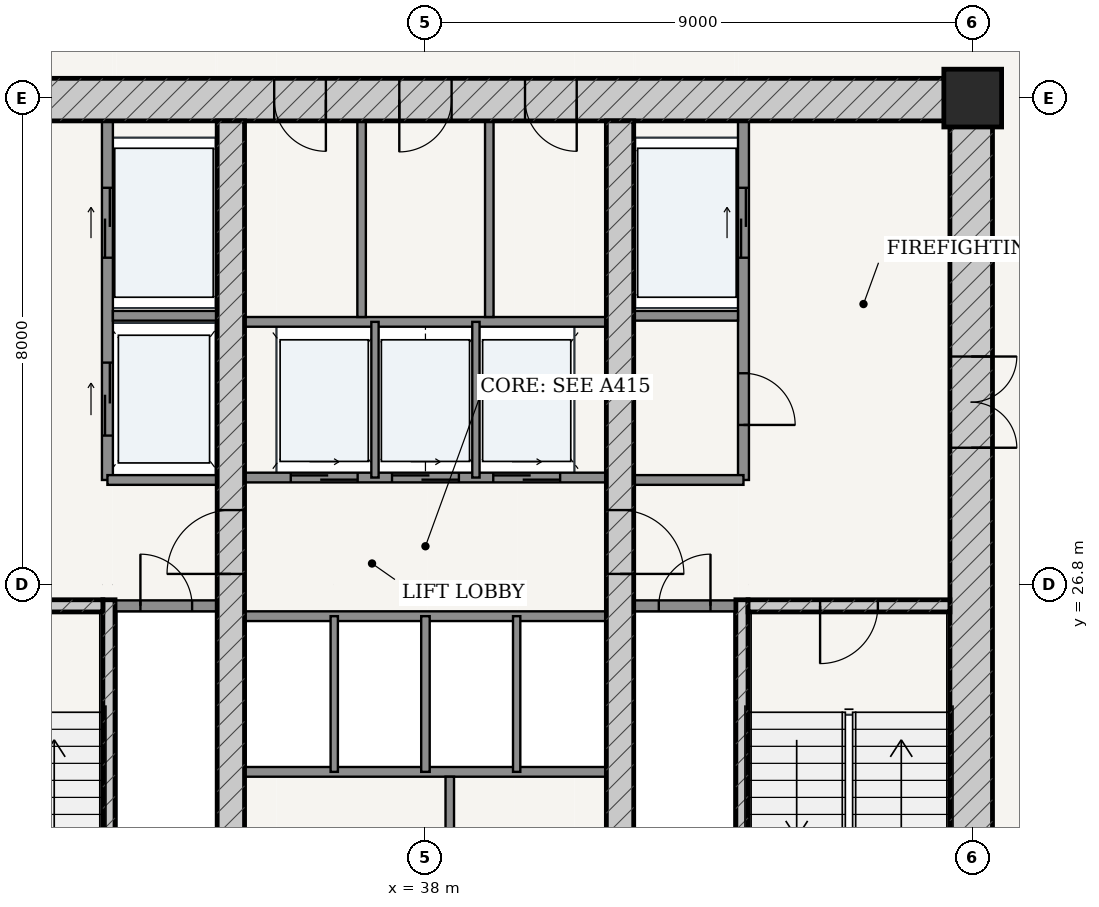
"""IFC4 building model, lengths in metres.
Left out: names, types, materials, properties, quantities, classifications, styles, units other than length and angle.
Written with IfcOpenShell. Run it as: python <this file> out.ifc"""

import sys

from ifc_helpers import new_model, si_unit, direction, frame, frame_2d, origin, origin_2d, place, context, subcontext, project, spatial, rectangle, extrude, source, transform, mapped, element, fill, save


model = new_model("IFC4")
c1 = context("Model", 3, precision=1e-05, world=origin(), true_north=direction((-0.2419218956, 0.970295726276)))
c2 = subcontext(c1, "Body", "Model", "MODEL_VIEW")
j1 = project(units=[si_unit("LENGTHUNIT", "METRE"), si_unit("PLANEANGLEUNIT", "RADIAN")], contexts=[c1])
p1 = place(None, origin())
s1 = spatial("IfcSite", under=j1, at=p1, CompositionType="ELEMENT")
p2 = place(p1, origin())
s2 = spatial("IfcBuilding", under=s1, at=p2, CompositionType="ELEMENT")
p3 = place(p2, frame((0.0, 0.0, 83.4)))
s3 = spatial("IfcBuildingStorey", under=s2, at=p3, CompositionType="ELEMENT", Elevation=83.4)
p4 = place(p3, frame((47.0, 34.8, 0.0), z_axis=(0.0, 0.0, 1.0), x_axis=(1.0, 0.0, 0.0)))
e1 = element("IfcColumn", 1, at=p4, inside=s3, PredefinedType="COLUMN", context=c2, shape_type="SweptSolid", body=[
    extrude(rectangle(XDim=0.95, YDim=0.95, at=origin_2d()), origin(), (0.0, 0.0, 1.0), 3.6),
])
p5 = place(p3, frame((28.675, 34.775, 0.0), z_axis=(0.0, 0.0, 1.0), x_axis=(1.0, 0.0, 0.0)))
e2 = element("IfcWall", 2, at=p5, inside=s3, PredefinedType="SHEAR", context=c2, shape_type="SweptSolid", body=[
    extrude(rectangle(XDim=18.65, YDim=0.7, at=frame_2d((9.325, 0.0))), origin(), (0.0, 0.0, 1.0), 3.325),
])
p6 = place(p5, frame((6.837, 0.0, 0.0)))
e3 = element("IfcOpeningElement", 3, at=p6, cuts=e2, PredefinedType="OPENING", context=c2, shape_type="SweptSolid", body=[
    extrude(rectangle(XDim=0.85, YDim=2.1, at=frame_2d((0.425, 1.05))), frame((0.0, 0.36, 0.0), z_axis=(0.0, -1.0, 0.0), x_axis=(1.0, 0.0, 0.0)), (0.0, 0.0, 1.0), 0.72),
])
p7 = place(p5, frame((8.895, 0.0, 0.0)))
e4 = element("IfcOpeningElement", 4, at=p7, cuts=e2, PredefinedType="OPENING", context=c2, shape_type="SweptSolid", body=[
    extrude(rectangle(XDim=0.86, YDim=2.1, at=frame_2d((0.43, 1.05))), frame((0.0, 0.36, 0.0), z_axis=(0.0, -1.0, 0.0), x_axis=(1.0, 0.0, 0.0)), (0.0, 0.0, 1.0), 0.72),
])
p8 = place(p5, frame((10.962, 0.0, 0.0)))
e5 = element("IfcOpeningElement", 5, at=p8, cuts=e2, PredefinedType="OPENING", context=c2, shape_type="SweptSolid", body=[
    extrude(rectangle(XDim=0.85, YDim=2.1, at=frame_2d((0.425, 1.05))), frame((0.0, 0.36, 0.0), z_axis=(0.0, -1.0, 0.0), x_axis=(1.0, 0.0, 0.0)), (0.0, 0.0, 1.0), 0.72),
])
p9 = place(p3, frame((46.975, 19.175, 0.0), z_axis=(0.0, 0.0, 1.0), x_axis=(0.0, 1.0, 0.0)))
e6 = element("IfcWall", 6, at=p9, inside=s3, PredefinedType="SHEAR", context=c2, shape_type="SweptSolid", body=[
    extrude(rectangle(XDim=15.25, YDim=0.7, at=frame_2d((7.625, 0.0))), origin(), (0.0, 0.0, 1.0), 3.325),
])
p10 = place(p9, frame((9.875, 0.0, 0.0)))
e7 = element("IfcOpeningElement", 7, at=p10, cuts=e6, PredefinedType="OPENING", context=c2, shape_type="SweptSolid", body=[
    extrude(rectangle(XDim=1.5, YDim=2.2, at=frame_2d((0.75, 1.1))), frame((0.0, 0.36, 0.0), z_axis=(0.0, -1.0, 0.0), x_axis=(1.0, 0.0, 0.0)), (0.0, 0.0, 1.0), 0.72),
])
p11 = place(p3, frame((32.795, 19.175, 0.0), z_axis=(0.0, 0.0, 1.0), x_axis=(0.0, 1.0, 0.0)))
e8 = element("IfcWall", 8, at=p11, inside=s3, PredefinedType="SOLIDWALL", context=c2, shape_type="SweptSolid", body=[
    extrude(rectangle(XDim=7.375, YDim=0.2, at=frame_2d((3.688, 0.0))), origin(), (0.0, 0.0, 1.0), 3.325),
])
p12 = place(p3, frame((29.375, 26.45, 0.0), z_axis=(0.0, 0.0, 1.0), x_axis=(1.0, 0.0, 0.0)))
e9 = element("IfcWall", 9, at=p12, inside=s3, PredefinedType="SOLIDWALL", context=c2, shape_type="SweptSolid", body=[
    extrude(rectangle(XDim=3.32, YDim=0.2, at=frame_2d((1.66, 0.0))), origin(), (0.0, 0.0, 1.0), 3.325),
])
p13 = place(p12, frame((1.185, 0.0, 0.0)))
e10 = element("IfcOpeningElement", 10, at=p13, cuts=e9, PredefinedType="OPENING", context=c2, shape_type="SweptSolid", body=[
    extrude(rectangle(XDim=0.95, YDim=2.15, at=frame_2d((0.475, 1.075))), frame((0.0, 0.11, 0.0), z_axis=(0.0, -1.0, 0.0), x_axis=(1.0, 0.0, 0.0)), (0.0, 0.0, 1.0), 0.22),
])
p14 = place(p3, frame((43.205, 19.175, 0.0), z_axis=(0.0, 0.0, 1.0), x_axis=(0.0, 1.0, 0.0)))
e11 = element("IfcWall", 11, at=p14, inside=s3, PredefinedType="SOLIDWALL", context=c2, shape_type="SweptSolid", body=[
    extrude(rectangle(XDim=7.375, YDim=0.2, at=frame_2d((3.688, 0.0))), origin(), (0.0, 0.0, 1.0), 3.325),
])
p15 = place(p3, frame((43.305, 26.45, 0.0), z_axis=(0.0, 0.0, 1.0), x_axis=(1.0, 0.0, 0.0)))
e12 = element("IfcWall", 12, at=p15, inside=s3, PredefinedType="SOLIDWALL", context=c2, shape_type="SweptSolid", body=[
    extrude(rectangle(XDim=3.32, YDim=0.2, at=frame_2d((1.66, 0.0))), origin(), (0.0, 0.0, 1.0), 3.325),
])
p16 = place(p15, frame((1.185, 0.0, 0.0)))
e13 = element("IfcOpeningElement", 13, at=p16, cuts=e12, PredefinedType="OPENING", context=c2, shape_type="SweptSolid", body=[
    extrude(rectangle(XDim=0.95, YDim=2.15, at=frame_2d((0.475, 1.075))), frame((0.0, 0.11, 0.0), z_axis=(0.0, -1.0, 0.0), x_axis=(1.0, 0.0, 0.0)), (0.0, 0.0, 1.0), 0.22),
])
p17 = place(p3, frame((34.8, 19.175, 0.0), z_axis=(0.0, 0.0, 1.0), x_axis=(0.0, 1.0, 0.0)))
e14 = element("IfcWall", 14, at=p17, inside=s3, PredefinedType="SHEAR", context=c2, shape_type="SweptSolid", body=[
    extrude(rectangle(XDim=15.25, YDim=0.45, at=frame_2d((7.625, 0.0))), origin(), (0.0, 0.0, 1.0), 3.325),
])
p18 = place(p17, frame((7.8, 0.0, 0.0)))
e15 = element("IfcOpeningElement", 15, at=p18, cuts=e14, PredefinedType="OPENING", context=c2, shape_type="SweptSolid", body=[
    extrude(rectangle(XDim=1.05, YDim=2.15, at=frame_2d((0.525, 1.075))), frame((0.0, 0.235, 0.0), z_axis=(0.0, -1.0, 0.0), x_axis=(1.0, 0.0, 0.0)), (0.0, 0.0, 1.0), 0.47),
])
p19 = place(p3, frame((41.2, 19.175, 0.0), z_axis=(0.0, 0.0, 1.0), x_axis=(0.0, 1.0, 0.0)))
e16 = element("IfcWall", 16, at=p19, inside=s3, PredefinedType="SHEAR", context=c2, shape_type="SweptSolid", body=[
    extrude(rectangle(XDim=15.25, YDim=0.45, at=frame_2d((7.625, 0.0))), origin(), (0.0, 0.0, 1.0), 3.325),
])
p20 = place(p19, frame((7.8, 0.0, 0.0)))
e17 = element("IfcOpeningElement", 17, at=p20, cuts=e16, PredefinedType="OPENING", context=c2, shape_type="SweptSolid", body=[
    extrude(rectangle(XDim=1.05, YDim=2.15, at=frame_2d((0.525, 1.075))), frame((0.0, 0.235, 0.0), z_axis=(0.0, -1.0, 0.0), x_axis=(1.0, 0.0, 0.0)), (0.0, 0.0, 1.0), 0.47),
])
p21 = place(p3, frame((32.9, 26.45, 0.0), z_axis=(0.0, 0.0, 1.0), x_axis=(1.0, 0.0, 0.0)))
e18 = element("IfcWall", 18, at=p21, inside=s3, PredefinedType="PARTITIONING", context=c2, shape_type="SweptSolid", body=[
    extrude(rectangle(XDim=1.675, YDim=0.18, at=frame_2d((0.837, 0.0))), origin(), (0.0, 0.0, 1.0), 3.325),
])
p22 = place(p21, frame((0.413, 0.0, 0.0)))
e19 = element("IfcOpeningElement", 19, at=p22, cuts=e18, PredefinedType="OPENING", context=c2, shape_type="SweptSolid", body=[
    extrude(rectangle(XDim=0.85, YDim=2.1, at=frame_2d((0.425, 1.05))), frame((0.0, 0.1, 0.0), z_axis=(0.0, -1.0, 0.0), x_axis=(1.0, 0.0, 0.0)), (0.0, 0.0, 1.0), 0.2),
])
p23 = place(p3, frame((41.425, 26.45, 0.0), z_axis=(0.0, 0.0, 1.0), x_axis=(1.0, 0.0, 0.0)))
e20 = element("IfcWall", 20, at=p23, inside=s3, PredefinedType="PARTITIONING", context=c2, shape_type="SweptSolid", body=[
    extrude(rectangle(XDim=1.675, YDim=0.18, at=frame_2d((0.837, 0.0))), origin(), (0.0, 0.0, 1.0), 3.325),
])
p24 = place(p23, frame((0.413, 0.0, 0.0)))
e21 = element("IfcOpeningElement", 21, at=p24, cuts=e20, PredefinedType="OPENING", context=c2, shape_type="SweptSolid", body=[
    extrude(rectangle(XDim=0.85, YDim=2.1, at=frame_2d((0.425, 1.05))), frame((0.0, 0.1, 0.0), z_axis=(0.0, -1.0, 0.0), x_axis=(1.0, 0.0, 0.0)), (0.0, 0.0, 1.0), 0.2),
])
p25 = place(p3, frame((32.77, 28.52, 0.0), z_axis=(0.0, 0.0, 1.0), x_axis=(0.0, 1.0, 0.0)))
e22 = element("IfcWall", 22, at=p25, inside=s3, PredefinedType="PARTITIONING", context=c2, shape_type="SweptSolid", body=[
    extrude(rectangle(XDim=5.905, YDim=0.18, at=frame_2d((2.953, 0.0))), origin(), (0.0, 0.0, 1.0), 3.325),
])
p26 = place(p25, frame((3.655, 0.0, 0.0)))
e23 = element("IfcOpeningElement", 23, at=p26, cuts=e22, PredefinedType="OPENING", context=c2, shape_type="SweptSolid", body=[
    extrude(rectangle(XDim=1.15, YDim=2.2, at=frame_2d((0.575, 1.1))), frame((0.0, 0.1, 0.0), z_axis=(0.0, -1.0, 0.0), x_axis=(1.0, 0.0, 0.0)), (0.0, 0.0, 1.0), 0.2),
])
p27 = place(p25, frame((0.73, 0.0, 0.0)))
e24 = element("IfcOpeningElement", 24, at=p27, cuts=e22, PredefinedType="OPENING", context=c2, shape_type="SweptSolid", body=[
    extrude(rectangle(XDim=1.2, YDim=2.25, at=frame_2d((0.6, 1.125))), frame((0.0, 0.1, 0.0), z_axis=(0.0, -1.0, 0.0), x_axis=(1.0, 0.0, 0.0)), (0.0, 0.0, 1.0), 0.2),
])
p28 = place(p3, frame((32.86, 31.22, 0.0), z_axis=(0.0, 0.0, 1.0), x_axis=(1.0, 0.0, 0.0)))
e25 = element("IfcWall", 25, at=p28, inside=s3, PredefinedType="PARTITIONING", context=c2, shape_type="SweptSolid", body=[
    extrude(rectangle(XDim=1.715, YDim=0.16, at=frame_2d((0.857, 0.0))), origin(), (0.0, 0.0, 1.0), 3.325),
])
p29 = place(p3, frame((32.77, 28.52, 0.0), z_axis=(0.0, 0.0, 1.0), x_axis=(1.0, 0.0, 0.0)))
e26 = element("IfcWall", 26, at=p29, inside=s3, PredefinedType="PARTITIONING", context=c2, shape_type="SweptSolid", body=[
    extrude(rectangle(XDim=1.805, YDim=0.16, at=frame_2d((0.902, 0.0))), origin(), (0.0, 0.0, 1.0), 3.325),
])
p30 = place(p3, frame((43.23, 28.52, 0.0), z_axis=(0.0, 0.0, 1.0), x_axis=(0.0, 1.0, 0.0)))
e27 = element("IfcWall", 27, at=p30, inside=s3, PredefinedType="PARTITIONING", context=c2, shape_type="SweptSolid", body=[
    extrude(rectangle(XDim=5.905, YDim=0.18, at=frame_2d((2.953, 0.0))), origin(), (0.0, 0.0, 1.0), 3.325),
])
p31 = place(p30, frame((0.905, 0.0, 0.0)))
e28 = element("IfcOpeningElement", 28, at=p31, cuts=e27, PredefinedType="OPENING", context=c2, shape_type="SweptSolid", body=[
    extrude(rectangle(XDim=0.85, YDim=2.1, at=frame_2d((0.425, 1.05))), frame((0.0, 0.1, 0.0), z_axis=(0.0, -1.0, 0.0), x_axis=(1.0, 0.0, 0.0)), (0.0, 0.0, 1.0), 0.2),
])
p32 = place(p30, frame((3.655, 0.0, 0.0)))
e29 = element("IfcOpeningElement", 29, at=p32, cuts=e27, PredefinedType="OPENING", context=c2, shape_type="SweptSolid", body=[
    extrude(rectangle(XDim=1.15, YDim=2.2, at=frame_2d((0.575, 1.1))), frame((0.0, 0.1, 0.0), z_axis=(0.0, -1.0, 0.0), x_axis=(1.0, 0.0, 0.0)), (0.0, 0.0, 1.0), 0.2),
])
p33 = place(p3, frame((41.425, 31.22, 0.0), z_axis=(0.0, 0.0, 1.0), x_axis=(1.0, 0.0, 0.0)))
e30 = element("IfcWall", 30, at=p33, inside=s3, PredefinedType="PARTITIONING", context=c2, shape_type="SweptSolid", body=[
    extrude(rectangle(XDim=1.715, YDim=0.16, at=frame_2d((0.857, 0.0))), origin(), (0.0, 0.0, 1.0), 3.325),
])
p34 = place(p3, frame((41.425, 28.52, 0.0), z_axis=(0.0, 0.0, 1.0), x_axis=(1.0, 0.0, 0.0)))
e31 = element("IfcWall", 31, at=p34, inside=s3, PredefinedType="PARTITIONING", context=c2, shape_type="SweptSolid", body=[
    extrude(rectangle(XDim=1.805, YDim=0.16, at=frame_2d((0.902, 0.0))), origin(), (0.0, 0.0, 1.0), 3.325),
])
p35 = place(p3, frame((35.025, 28.56, 0.0), z_axis=(0.0, 0.0, 1.0), x_axis=(1.0, 0.0, 0.0)))
e32 = element("IfcWall", 32, at=p35, inside=s3, PredefinedType="PARTITIONING", context=c2, shape_type="SweptSolid", body=[
    extrude(rectangle(XDim=5.95, YDim=0.16, at=frame_2d((2.975, 0.0))), origin(), (0.0, 0.0, 1.0), 3.325),
])
p36 = place(p35, frame((0.76, 0.0, 0.0)))
e33 = element("IfcOpeningElement", 33, at=p36, cuts=e32, PredefinedType="OPENING", context=c2, shape_type="SweptSolid", body=[
    extrude(rectangle(XDim=1.1, YDim=2.2, at=frame_2d((0.55, 1.1))), frame((0.0, 0.09, 0.0), z_axis=(0.0, -1.0, 0.0), x_axis=(1.0, 0.0, 0.0)), (0.0, 0.0, 1.0), 0.18),
])
p37 = place(p35, frame((2.425, 0.0, 0.0)))
e34 = element("IfcOpeningElement", 34, at=p37, cuts=e32, PredefinedType="OPENING", context=c2, shape_type="SweptSolid", body=[
    extrude(rectangle(XDim=1.1, YDim=2.2, at=frame_2d((0.55, 1.1))), frame((0.0, 0.09, 0.0), z_axis=(0.0, -1.0, 0.0), x_axis=(1.0, 0.0, 0.0)), (0.0, 0.0, 1.0), 0.18),
])
p38 = place(p35, frame((4.09, 0.0, 0.0)))
e35 = element("IfcOpeningElement", 35, at=p38, cuts=e32, PredefinedType="OPENING", context=c2, shape_type="SweptSolid", body=[
    extrude(rectangle(XDim=1.1, YDim=2.2, at=frame_2d((0.55, 1.1))), frame((0.0, 0.09, 0.0), z_axis=(0.0, -1.0, 0.0), x_axis=(1.0, 0.0, 0.0)), (0.0, 0.0, 1.0), 0.18),
])
p39 = place(p3, frame((35.025, 31.12, 0.0), z_axis=(0.0, 0.0, 1.0), x_axis=(1.0, 0.0, 0.0)))
e36 = element("IfcWall", 36, at=p39, inside=s3, PredefinedType="PARTITIONING", context=c2, shape_type="SweptSolid", body=[
    extrude(rectangle(XDim=5.95, YDim=0.16, at=frame_2d((2.975, 0.0))), origin(), (0.0, 0.0, 1.0), 3.325),
])
for number, where, z_axis, x_axis in (
    (37, (37.17, 28.56, 0.0), (0.0, 0.0, 1.0), (0.0, 1.0, 0.0)),
    (38, (38.83, 28.56, 0.0), (0.0, 0.0, 1.0), (0.0, 1.0, 0.0)),
):
    element("IfcWall", number, at=place(p3, frame(where, z_axis=z_axis, x_axis=x_axis)), inside=s3, PredefinedType="PARTITIONING", context=c2, shape_type="SweptSolid", body=[
        extrude(rectangle(XDim=2.56, YDim=0.12, at=frame_2d((1.28, 0.0))), origin(), (0.0, 0.0, 1.0), 3.325),
    ])
for number, where, z_axis, x_axis in (
    (39, (36.95, 31.2, 0.0), (0.0, 0.0, 1.0), (0.0, 1.0, 0.0)),
    (40, (39.05, 31.2, 0.0), (0.0, 0.0, 1.0), (0.0, 1.0, 0.0)),
):
    element("IfcWall", number, at=place(p3, frame(where, z_axis=z_axis, x_axis=x_axis)), inside=s3, PredefinedType="PARTITIONING", context=c2, shape_type="SweptSolid", body=[
        extrude(rectangle(XDim=3.225, YDim=0.14, at=frame_2d((1.613, 0.0))), origin(), (0.0, 0.0, 1.0), 3.325),
    ])
for number, where, z_axis, x_axis in (
    (41, (35.025, 26.28, 0.0), (0.0, 0.0, 1.0), (1.0, 0.0, 0.0)),
    (42, (35.025, 23.72, 0.0), (0.0, 0.0, 1.0), (1.0, 0.0, 0.0)),
):
    element("IfcWall", number, at=place(p3, frame(where, z_axis=z_axis, x_axis=x_axis)), inside=s3, PredefinedType="PARTITIONING", context=c2, shape_type="SweptSolid", body=[
        extrude(rectangle(XDim=5.95, YDim=0.16, at=frame_2d((2.975, 0.0))), origin(), (0.0, 0.0, 1.0), 3.325),
    ])
p40 = place(p3, frame((36.5, 23.72, 0.0), z_axis=(0.0, 0.0, 1.0), x_axis=(0.0, 1.0, 0.0)))
e43 = element("IfcWall", 43, at=p40, inside=s3, PredefinedType="PARTITIONING", context=c2, shape_type="SweptSolid", body=[
    extrude(rectangle(XDim=2.56, YDim=0.12, at=frame_2d((1.28, 0.0))), origin(), (0.0, 0.0, 1.0), 3.325),
])
p41 = place(p3, frame((38.0, 23.72, 0.0), z_axis=(0.0, 0.0, 1.0), x_axis=(0.0, 1.0, 0.0)))
e44 = element("IfcWall", 44, at=p41, inside=s3, PredefinedType="PARTITIONING", context=c2, shape_type="SweptSolid", body=[
    extrude(rectangle(XDim=2.56, YDim=0.14, at=frame_2d((1.28, 0.0))), origin(), (0.0, 0.0, 1.0), 3.325),
])
p42 = place(p3, frame((39.5, 23.72, 0.0), z_axis=(0.0, 0.0, 1.0), x_axis=(0.0, 1.0, 0.0)))
e45 = element("IfcWall", 45, at=p42, inside=s3, PredefinedType="PARTITIONING", context=c2, shape_type="SweptSolid", body=[
    extrude(rectangle(XDim=2.56, YDim=0.12, at=frame_2d((1.28, 0.0))), origin(), (0.0, 0.0, 1.0), 3.325),
])
p43 = place(p3, frame((38.4, 19.175, 0.0), z_axis=(0.0, 0.0, 1.0), x_axis=(0.0, 1.0, 0.0)))
e46 = element("IfcWall", 46, at=p43, inside=s3, PredefinedType="PARTITIONING", context=c2, shape_type="SweptSolid", body=[
    extrude(rectangle(XDim=4.465, YDim=0.14, at=frame_2d((2.232, 0.0))), origin(), (0.0, 0.0, 1.0), 3.325),
])
m1 = source(origin(), c2, "Body", "SweptSolid", [
    extrude(rectangle(XDim=1.5, YDim=2.2, at=frame_2d((0.75, 1.1))), frame((0.0, 0.025, 0.0), z_axis=(0.0, -1.0, 0.0), x_axis=(1.0, 0.0, 0.0)), (0.0, 0.0, 1.0), 0.05),
])
p44 = place(p10, frame((1.5, 0.0, 0.0), z_axis=(0.0, 0.0, 1.0), x_axis=(-1.0, 0.0, 0.0)))
e47 = element("IfcDoor", 47, at=p44, inside=s3, OperationType="DOUBLE_DOOR_SINGLE_SWING", PredefinedType="DOOR", context=c2, shape_type="MappedRepresentation", body=[
    mapped(m1, transform((0.0, 0.0, 0.0), scale=1.0)),
])
fill(e7, e47)
m2 = source(origin(), c2, "Body", "SweptSolid", [
    extrude(rectangle(XDim=1.05, YDim=2.15, at=frame_2d((0.525, 1.075))), frame((0.0, 0.025, 0.0), z_axis=(0.0, -1.0, 0.0), x_axis=(1.0, 0.0, 0.0)), (0.0, 0.0, 1.0), 0.05),
])
p45 = place(p18, origin())
e48 = element("IfcDoor", 48, at=p45, inside=s3, OperationType="SINGLE_SWING_LEFT", PredefinedType="DOOR", context=c2, shape_type="MappedRepresentation", body=[
    mapped(m2, transform((0.0, 0.0, 0.0), scale=1.0)),
])
fill(e15, e48)
p46 = place(p20, frame((1.05, 0.0, 0.0), z_axis=(0.0, 0.0, 1.0), x_axis=(-1.0, 0.0, 0.0)))
e49 = element("IfcDoor", 49, at=p46, inside=s3, OperationType="SINGLE_SWING_RIGHT", PredefinedType="DOOR", context=c2, shape_type="MappedRepresentation", body=[
    mapped(m2, transform((0.0, 0.0, 0.0), scale=1.0)),
])
fill(e17, e49)
m3 = source(origin(), c2, "Body", "SweptSolid", [
    extrude(rectangle(XDim=0.95, YDim=2.15, at=frame_2d((0.475, 1.075))), frame((0.0, 0.025, 0.0), z_axis=(0.0, -1.0, 0.0), x_axis=(1.0, 0.0, 0.0)), (0.0, 0.0, 1.0), 0.05),
])
p47 = place(p16, frame((0.95, 0.0, 0.0), z_axis=(0.0, 0.0, 1.0), x_axis=(-1.0, 0.0, 0.0)))
e50 = element("IfcDoor", 50, at=p47, inside=s3, OperationType="SINGLE_SWING_RIGHT", PredefinedType="DOOR", context=c2, shape_type="MappedRepresentation", body=[
    mapped(m3, transform((0.0, 0.0, 0.0), scale=1.0)),
])
fill(e13, e50)
m4 = source(origin(), c2, "Body", "SweptSolid", [
    extrude(rectangle(XDim=0.85, YDim=2.1, at=frame_2d((0.425, 1.05))), frame((0.0, 0.025, 0.0), z_axis=(0.0, -1.0, 0.0), x_axis=(1.0, 0.0, 0.0)), (0.0, 0.0, 1.0), 0.05),
])
p48 = place(p22, origin())
e51 = element("IfcDoor", 51, at=p48, inside=s3, OperationType="SINGLE_SWING_LEFT", PredefinedType="DOOR", context=c2, shape_type="MappedRepresentation", body=[
    mapped(m4, transform((0.0, 0.0, 0.0), scale=1.0)),
])
fill(e19, e51)
p49 = place(p24, origin())
e52 = element("IfcDoor", 52, at=p49, inside=s3, OperationType="SINGLE_SWING_RIGHT", PredefinedType="DOOR", context=c2, shape_type="MappedRepresentation", body=[
    mapped(m4, transform((0.0, 0.0, 0.0), scale=1.0)),
])
fill(e21, e52)
p50 = place(p31, frame((0.85, 0.0, 0.0), z_axis=(0.0, 0.0, 1.0), x_axis=(-1.0, 0.0, 0.0)))
e53 = element("IfcDoor", 53, at=p50, inside=s3, OperationType="SINGLE_SWING_RIGHT", PredefinedType="DOOR", context=c2, shape_type="MappedRepresentation", body=[
    mapped(m4, transform((0.0, 0.0, 0.0), scale=1.0)),
])
fill(e28, e53)
p51 = place(p6, frame((0.85, 0.0, 0.0), z_axis=(0.0, 0.0, 1.0), x_axis=(-1.0, 0.0, 0.0)))
e54 = element("IfcDoor", 54, at=p51, inside=s3, OperationType="SINGLE_SWING_LEFT", PredefinedType="DOOR", context=c2, shape_type="MappedRepresentation", body=[
    mapped(m4, transform((0.0, 0.0, 0.0), scale=1.0)),
])
fill(e3, e54)
m5 = source(origin(), c2, "Body", "SweptSolid", [
    extrude(rectangle(XDim=0.86, YDim=2.1, at=frame_2d((0.43, 1.05))), frame((0.0, 0.025, 0.0), z_axis=(0.0, -1.0, 0.0), x_axis=(1.0, 0.0, 0.0)), (0.0, 0.0, 1.0), 0.05),
])
p52 = place(p7, frame((0.86, 0.0, 0.0), z_axis=(0.0, 0.0, 1.0), x_axis=(-1.0, 0.0, 0.0)))
e55 = element("IfcDoor", 55, at=p52, inside=s3, OperationType="SINGLE_SWING_RIGHT", PredefinedType="DOOR", context=c2, shape_type="MappedRepresentation", body=[
    mapped(m5, transform((0.0, 0.0, 0.0), scale=1.0)),
])
fill(e4, e55)
p53 = place(p8, frame((0.85, 0.0, 0.0), z_axis=(0.0, 0.0, 1.0), x_axis=(-1.0, 0.0, 0.0)))
e56 = element("IfcDoor", 56, at=p53, inside=s3, OperationType="SINGLE_SWING_LEFT", PredefinedType="DOOR", context=c2, shape_type="MappedRepresentation", body=[
    mapped(m4, transform((0.0, 0.0, 0.0), scale=1.0)),
])
fill(e5, e56)
m6 = source(origin(), c2, "Body", "SweptSolid", [
    extrude(rectangle(XDim=1.15, YDim=2.2, at=frame_2d((0.575, 1.1))), frame((0.0, 0.025, 0.0), z_axis=(0.0, -1.0, 0.0), x_axis=(1.0, 0.0, 0.0)), (0.0, 0.0, 1.0), 0.05),
])
p54 = place(p26, origin())
e57 = element("IfcDoor", 57, at=p54, inside=s3, OperationType="DOUBLE_DOOR_SLIDING", PredefinedType="DOOR", context=c2, shape_type="MappedRepresentation", body=[
    mapped(m6, transform((0.0, 0.0, 0.0), scale=1.0)),
])
fill(e23, e57)
p55 = place(p32, origin())
e58 = element("IfcDoor", 58, at=p55, inside=s3, OperationType="DOUBLE_DOOR_SLIDING", PredefinedType="DOOR", context=c2, shape_type="MappedRepresentation", body=[
    mapped(m6, transform((0.0, 0.0, 0.0), scale=1.0)),
])
fill(e29, e58)
m7 = source(origin(), c2, "Body", "SweptSolid", [
    extrude(rectangle(XDim=1.2, YDim=2.25, at=frame_2d((0.6, 1.125))), frame((0.0, 0.025, 0.0), z_axis=(0.0, -1.0, 0.0), x_axis=(1.0, 0.0, 0.0)), (0.0, 0.0, 1.0), 0.05),
])
p56 = place(p27, origin())
e59 = element("IfcDoor", 59, at=p56, inside=s3, OperationType="DOUBLE_DOOR_SLIDING", PredefinedType="DOOR", context=c2, shape_type="MappedRepresentation", body=[
    mapped(m7, transform((0.0, 0.0, 0.0), scale=1.0)),
])
fill(e24, e59)
m8 = source(origin(), c2, "Body", "SweptSolid", [
    extrude(rectangle(XDim=1.1, YDim=2.2, at=frame_2d((0.55, 1.1))), frame((0.0, 0.025, 0.0), z_axis=(0.0, -1.0, 0.0), x_axis=(1.0, 0.0, 0.0)), (0.0, 0.0, 1.0), 0.05),
])
p57 = place(p36, origin())
e60 = element("IfcDoor", 60, at=p57, inside=s3, OperationType="DOUBLE_DOOR_SLIDING", PredefinedType="DOOR", context=c2, shape_type="MappedRepresentation", body=[
    mapped(m8, transform((0.0, 0.0, 0.0), scale=1.0)),
])
fill(e33, e60)
p58 = place(p37, origin())
e61 = element("IfcDoor", 61, at=p58, inside=s3, OperationType="DOUBLE_DOOR_SLIDING", PredefinedType="DOOR", context=c2, shape_type="MappedRepresentation", body=[
    mapped(m8, transform((0.0, 0.0, 0.0), scale=1.0)),
])
fill(e34, e61)
p59 = place(p38, origin())
e62 = element("IfcDoor", 62, at=p59, inside=s3, OperationType="DOUBLE_DOOR_SLIDING", PredefinedType="DOOR", context=c2, shape_type="MappedRepresentation", body=[
    mapped(m8, transform((0.0, 0.0, 0.0), scale=1.0)),
])
fill(e35, e62)
save(model, sys.argv[1])
